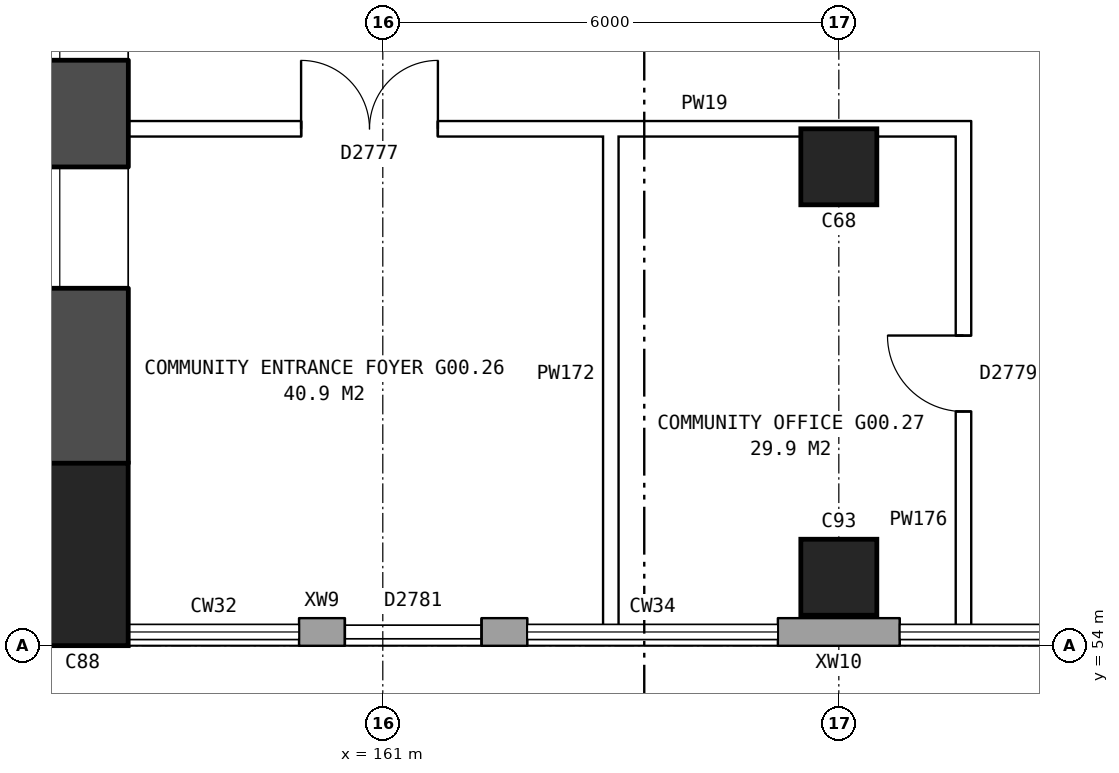
"""IFC4 building model, lengths in metres.
Left out: names, types, materials, properties, quantities, classifications, styles, units other than length and angle.
Written with IfcOpenShell. Run it as: python <this file> out.ifc"""

import sys

from ifc_helpers import new_model, si_unit, direction, frame, frame_2d, origin, origin_2d, place, context, subcontext, project, spatial, rectangle, extrude, element, fill, save


model = new_model("IFC4")
c1 = context("Model", 3, precision=1e-05, world=origin(), true_north=direction((0.0, 1.0)))
c2 = subcontext(c1, "Body", "Model", "MODEL_VIEW")
j1 = project(units=[si_unit("LENGTHUNIT", "METRE"), si_unit("PLANEANGLEUNIT", "RADIAN")], contexts=[c1])
p1 = place(None, origin())
s1 = spatial("IfcSite", under=j1, at=p1, CompositionType="ELEMENT")
p2 = place(p1, origin())
s2 = spatial("IfcBuilding", under=s1, at=p2, CompositionType="ELEMENT")
p3 = place(p2, origin())
s3 = spatial("IfcBuildingStorey", under=s2, at=p3, CompositionType="ELEMENT", Elevation=0.0)
p4 = place(p3, frame((157.05, 55.2, -0.35), z_axis=(0.0, 0.0, 1.0), x_axis=(1.0, 0.0, 0.0)))
e1 = element("IfcColumn", 1, at=p4, inside=s3, PredefinedType="COLUMN", context=c2, shape_type="SweptSolid", body=[
    extrude(rectangle(XDim=1.2, YDim=2.4, at=origin_2d()), origin(), (0.0, 0.0, 1.0), 5.55),
])
p5 = place(p3, frame((157.05, 56.4, -0.35), z_axis=(0.0, 0.0, 1.0), x_axis=(0.0, 1.0, 0.0)))
e2 = element("IfcWall", 2, at=p5, inside=s3, PredefinedType="SHEAR", context=c2, shape_type="SweptSolid", body=[
    extrude(rectangle(XDim=27.2, YDim=1.2, at=frame_2d((13.6, 0.0))), origin(), (0.0, 0.0, 1.0), 5.55),
])
p6 = place(p5, frame((2.3, 0.0, 0.8)))
e3 = element("IfcOpeningElement", 3, at=p6, cuts=e2, PredefinedType="OPENING", context=c2, shape_type="SweptSolid", body=[
    extrude(rectangle(XDim=1.6, YDim=1.8, at=frame_2d((0.8, 0.9))), frame((0.0, 0.61, 0.0), z_axis=(0.0, -1.0, 0.0), x_axis=(1.0, 0.0, 0.0)), (0.0, 0.0, 1.0), 1.22),
])
p7 = place(p5, frame((5.3, 0.0, 0.8)))
e4 = element("IfcOpeningElement", 4, at=p7, cuts=e2, PredefinedType="OPENING", context=c2, shape_type="SweptSolid", body=[
    extrude(rectangle(XDim=1.6, YDim=1.8, at=frame_2d((0.8, 0.9))), frame((0.0, 0.61, 0.0), z_axis=(0.0, -1.0, 0.0), x_axis=(1.0, 0.0, 0.0)), (0.0, 0.0, 1.0), 1.22),
])
p8 = place(p5, frame((8.3, 0.0, 0.8)))
e5 = element("IfcOpeningElement", 5, at=p8, cuts=e2, PredefinedType="OPENING", context=c2, shape_type="SweptSolid", body=[
    extrude(rectangle(XDim=1.6, YDim=1.8, at=frame_2d((0.8, 0.9))), frame((0.0, 0.61, 0.0), z_axis=(0.0, -1.0, 0.0), x_axis=(1.0, 0.0, 0.0)), (0.0, 0.0, 1.0), 1.22),
])
p9 = place(p5, frame((11.3, 0.0, 0.8)))
e6 = element("IfcOpeningElement", 6, at=p9, cuts=e2, PredefinedType="OPENING", context=c2, shape_type="SweptSolid", body=[
    extrude(rectangle(XDim=1.6, YDim=1.8, at=frame_2d((0.8, 0.9))), frame((0.0, 0.61, 0.0), z_axis=(0.0, -1.0, 0.0), x_axis=(1.0, 0.0, 0.0)), (0.0, 0.0, 1.0), 1.22),
])
p10 = place(p5, frame((14.3, 0.0, 0.8)))
e7 = element("IfcOpeningElement", 7, at=p10, cuts=e2, PredefinedType="OPENING", context=c2, shape_type="SweptSolid", body=[
    extrude(rectangle(XDim=1.6, YDim=1.8, at=frame_2d((0.8, 0.9))), frame((0.0, 0.61, 0.0), z_axis=(0.0, -1.0, 0.0), x_axis=(1.0, 0.0, 0.0)), (0.0, 0.0, 1.0), 1.22),
])
p11 = place(p5, frame((17.3, 0.0, 0.8)))
e8 = element("IfcOpeningElement", 8, at=p11, cuts=e2, PredefinedType="OPENING", context=c2, shape_type="SweptSolid", body=[
    extrude(rectangle(XDim=1.6, YDim=1.8, at=frame_2d((0.8, 0.9))), frame((0.0, 0.61, 0.0), z_axis=(0.0, -1.0, 0.0), x_axis=(1.0, 0.0, 0.0)), (0.0, 0.0, 1.0), 1.22),
])
p12 = place(p5, frame((20.3, 0.0, 0.8)))
e9 = element("IfcOpeningElement", 9, at=p12, cuts=e2, PredefinedType="OPENING", context=c2, shape_type="SweptSolid", body=[
    extrude(rectangle(XDim=1.6, YDim=1.8, at=frame_2d((0.8, 0.9))), frame((0.0, 0.61, 0.0), z_axis=(0.0, -1.0, 0.0), x_axis=(1.0, 0.0, 0.0)), (0.0, 0.0, 1.0), 1.22),
])
p13 = place(p5, frame((23.3, 0.0, 0.8)))
e10 = element("IfcOpeningElement", 10, at=p13, cuts=e2, PredefinedType="OPENING", context=c2, shape_type="SweptSolid", body=[
    extrude(rectangle(XDim=1.6, YDim=1.8, at=frame_2d((0.8, 0.9))), frame((0.0, 0.61, 0.0), z_axis=(0.0, -1.0, 0.0), x_axis=(1.0, 0.0, 0.0)), (0.0, 0.0, 1.0), 1.22),
])
for number, where, z_axis, x_axis in (
    (11, (167.0, 54.9, -0.35), (0.0, 0.0, 1.0), (1.0, 0.0, 0.0)),
    (12, (167.0, 60.3, -0.35), (0.0, 0.0, 1.0), (1.0, 0.0, 0.0)),
):
    element("IfcColumn", number, at=place(p3, frame(where, z_axis=z_axis, x_axis=x_axis)), inside=s3, PredefinedType="COLUMN", context=c2, shape_type="SweptSolid", body=[
        extrude(rectangle(XDim=1.0, YDim=1.0, at=origin_2d()), origin(), (0.0, 0.0, 1.0), 5.55),
    ])
p14 = place(p3, frame((166.2, 54.18, 0.0), z_axis=(0.0, 0.0, 1.0), x_axis=(1.0, 0.0, 0.0)))
e13 = element("IfcWall", 13, at=p14, inside=s3, PredefinedType="STANDARD", context=c2, shape_type="SweptSolid", body=[
    extrude(rectangle(XDim=1.6, YDim=0.36, at=frame_2d((0.8, 0.0))), origin(), (0.0, 0.0, 1.0), 5.2),
])
p15 = place(p3, frame((159.9, 54.18, 0.0), z_axis=(0.0, 0.0, 1.0), x_axis=(1.0, 0.0, 0.0)))
e14 = element("IfcWall", 14, at=p15, inside=s3, PredefinedType="STANDARD", context=c2, shape_type="SweptSolid", body=[
    extrude(rectangle(XDim=3.0, YDim=0.36, at=frame_2d((1.5, 0.0))), origin(), (0.0, 0.0, 1.0), 5.2),
])
p16 = place(p15, frame((0.6, 0.0, 0.0)))
e15 = element("IfcOpeningElement", 15, at=p16, cuts=e14, PredefinedType="OPENING", context=c2, shape_type="SweptSolid", body=[
    extrude(rectangle(XDim=1.8, YDim=2.4, at=frame_2d((0.9, 1.2))), frame((0.0, 0.19, 0.0), z_axis=(0.0, -1.0, 0.0), x_axis=(1.0, 0.0, 0.0)), (0.0, 0.0, 1.0), 0.38),
])
p17 = place(p3, frame((157.53, 60.8, 0.0), z_axis=(0.0, 0.0, 1.0), x_axis=(1.0, 0.0, 0.0)))
e16 = element("IfcWall", 16, at=p17, inside=s3, PredefinedType="PARTITIONING", context=c2, shape_type="SweptSolid", body=[
    extrude(rectangle(XDim=11.21, YDim=0.2, at=frame_2d((5.605, 0.0))), origin(), (0.0, 0.0, 1.0), 5.2),
])
p18 = place(p17, frame((2.395, 0.0, 0.0)))
e17 = element("IfcOpeningElement", 17, at=p18, cuts=e16, PredefinedType="OPENING", context=c2, shape_type="SweptSolid", body=[
    extrude(rectangle(XDim=1.8, YDim=2.1, at=frame_2d((0.9, 1.05))), frame((0.0, 0.11, 0.0), z_axis=(0.0, -1.0, 0.0), x_axis=(1.0, 0.0, 0.0)), (0.0, 0.0, 1.0), 0.22),
])
p19 = place(p3, frame((164.0, 54.24, 0.0), z_axis=(0.0, 0.0, 1.0), x_axis=(0.0, 1.0, 0.0)))
e18 = element("IfcWall", 18, at=p19, inside=s3, PredefinedType="PARTITIONING", context=c2, shape_type="SweptSolid", body=[
    extrude(rectangle(XDim=6.66, YDim=0.2, at=frame_2d((3.33, 0.0))), origin(), (0.0, 0.0, 1.0), 5.2),
])
p20 = place(p3, frame((168.64, 54.24, 0.0), z_axis=(0.0, 0.0, 1.0), x_axis=(0.0, 1.0, 0.0)))
e19 = element("IfcWall", 19, at=p20, inside=s3, PredefinedType="PARTITIONING", context=c2, shape_type="SweptSolid", body=[
    extrude(rectangle(XDim=6.66, YDim=0.2, at=frame_2d((3.33, 0.0))), origin(), (0.0, 0.0, 1.0), 5.2),
])
p21 = place(p20, frame((2.84, 0.0, 0.0)))
e20 = element("IfcOpeningElement", 20, at=p21, cuts=e19, PredefinedType="OPENING", context=c2, shape_type="SweptSolid", body=[
    extrude(rectangle(XDim=1.0, YDim=2.1, at=frame_2d((0.5, 1.05))), frame((0.0, 0.11, 0.0), z_axis=(0.0, -1.0, 0.0), x_axis=(1.0, 0.0, 0.0)), (0.0, 0.0, 1.0), 0.22),
])
p22 = place(p16, frame((1.8, 0.0, 0.0), z_axis=(0.0, 0.0, 1.0), x_axis=(-1.0, 0.0, 0.0)))
e21 = element("IfcDoor", 21, at=p22, inside=s3, OperationType="DOUBLE_DOOR_SLIDING", PredefinedType="DOOR", context=c2, shape_type="SweptSolid", body=[
    extrude(rectangle(XDim=1.8, YDim=2.4, at=frame_2d((0.9, 1.2))), frame((0.0, 0.025, 0.0), z_axis=(0.0, -1.0, 0.0), x_axis=(1.0, 0.0, 0.0)), (0.0, 0.0, 1.0), 0.05),
])
fill(e15, e21)
p23 = place(p6, origin())
e22 = element("IfcWindow", 22, at=p23, inside=s3, PartitioningType="SINGLE_PANEL", PredefinedType="WINDOW", context=c2, shape_type="SweptSolid", body=[
    extrude(rectangle(XDim=1.6, YDim=1.8, at=frame_2d((0.8, 0.9))), frame((0.0, 0.33, 0.0), z_axis=(0.0, -1.0, 0.0), x_axis=(1.0, 0.0, 0.0)), (0.0, 0.0, 1.0), 0.06),
])
fill(e3, e22)
p24 = place(p7, origin())
e23 = element("IfcWindow", 23, at=p24, inside=s3, PartitioningType="SINGLE_PANEL", PredefinedType="WINDOW", context=c2, shape_type="SweptSolid", body=[
    extrude(rectangle(XDim=1.6, YDim=1.8, at=frame_2d((0.8, 0.9))), frame((0.0, 0.33, 0.0), z_axis=(0.0, -1.0, 0.0), x_axis=(1.0, 0.0, 0.0)), (0.0, 0.0, 1.0), 0.06),
])
fill(e4, e23)
p25 = place(p18, origin())
e24 = element("IfcDoor", 24, at=p25, inside=s3, OperationType="DOUBLE_DOOR_SINGLE_SWING", PredefinedType="DOOR", context=c2, shape_type="SweptSolid", body=[
    extrude(rectangle(XDim=1.8, YDim=2.1, at=frame_2d((0.9, 1.05))), frame((0.0, 0.025, 0.0), z_axis=(0.0, -1.0, 0.0), x_axis=(1.0, 0.0, 0.0)), (0.0, 0.0, 1.0), 0.05),
])
fill(e17, e24)
p26 = place(p21, origin())
e25 = element("IfcDoor", 25, at=p26, inside=s3, OperationType="SINGLE_SWING_RIGHT", PredefinedType="DOOR", context=c2, shape_type="SweptSolid", body=[
    extrude(rectangle(XDim=1.0, YDim=2.1, at=frame_2d((0.5, 1.05))), frame((0.0, 0.025, 0.0), z_axis=(0.0, -1.0, 0.0), x_axis=(1.0, 0.0, 0.0)), (0.0, 0.0, 1.0), 0.05),
])
fill(e20, e25)
save(model, sys.argv[1])
